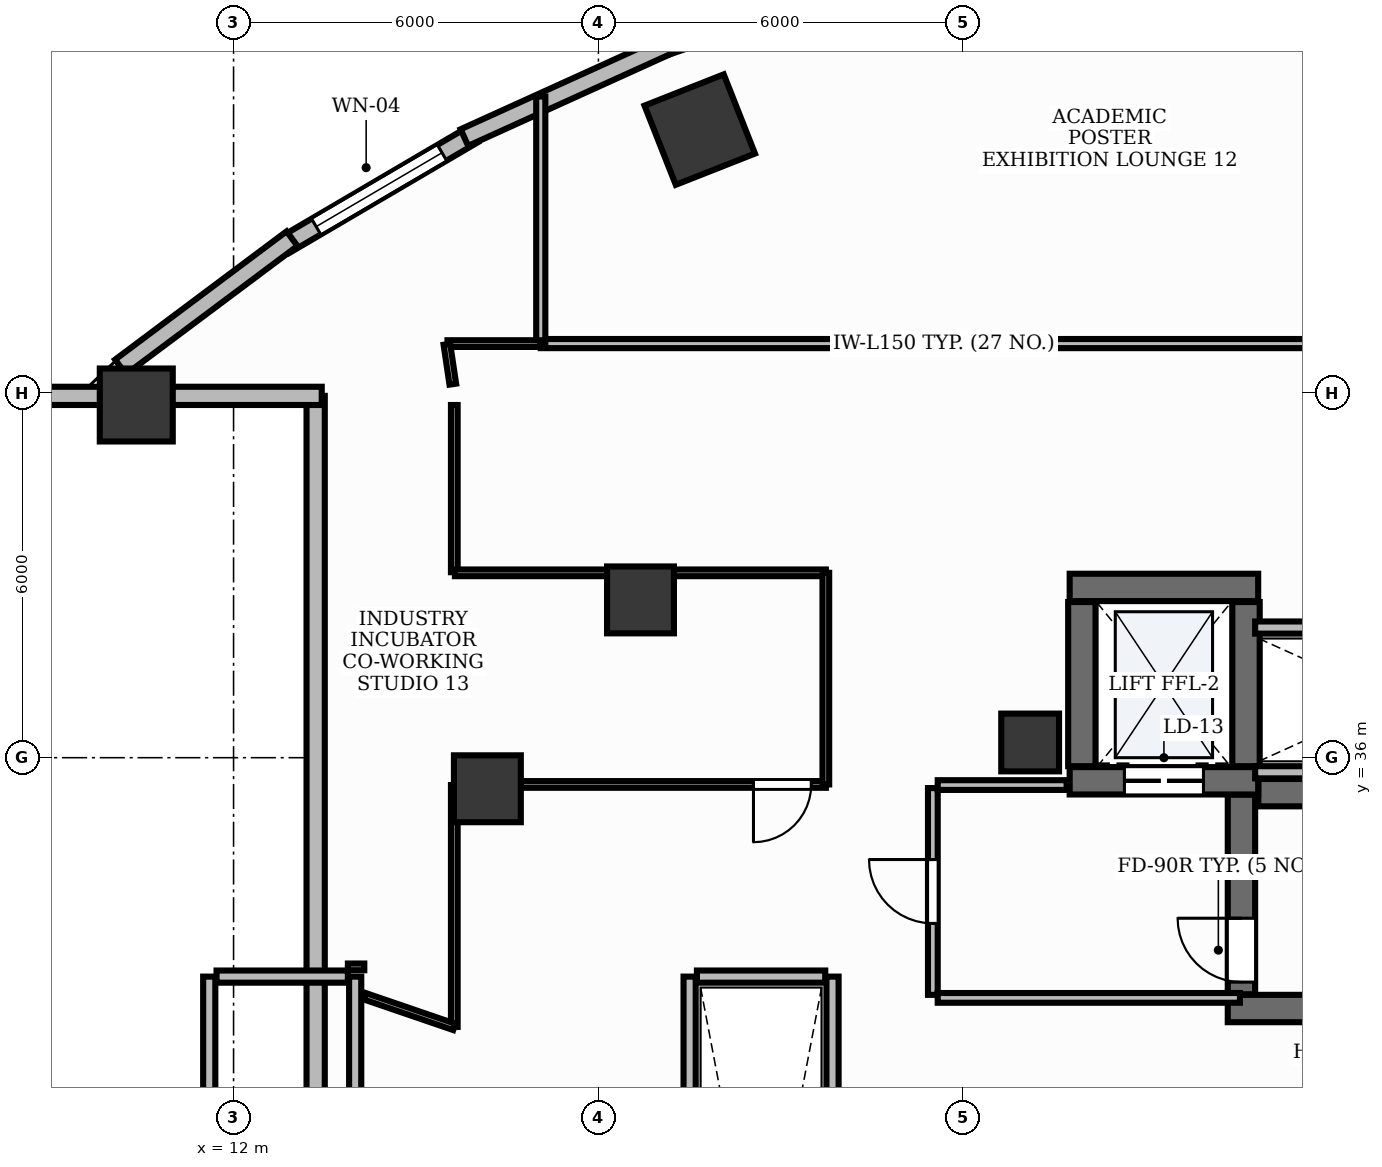
"""IFC4 building model, lengths in metres.
Left out: names, types, materials, properties, quantities, classifications, styles, units other than length and angle.
Written with IfcOpenShell. Run it as: python <this file> out.ifc"""

import sys

from ifc_helpers import new_model, si_unit, direction, frame, frame_2d, origin, origin_2d, place, context, subcontext, project, spatial, rectangle, extrude, element, fill, save


model = new_model("IFC4")
c1 = context("Model", 3, precision=1e-05, world=origin(), true_north=direction((0.0, 1.0)))
c2 = subcontext(c1, "Body", "Model", "MODEL_VIEW")
j1 = project(units=[si_unit("LENGTHUNIT", "METRE"), si_unit("PLANEANGLEUNIT", "RADIAN")], contexts=[c1])
p1 = place(None, origin())
s1 = spatial("IfcSite", under=j1, at=p1, CompositionType="ELEMENT")
p2 = place(p1, origin())
s2 = spatial("IfcBuilding", under=s1, at=p2, CompositionType="ELEMENT")
p3 = place(p2, frame((0.0, 0.0, 5.4)))
s3 = spatial("IfcBuildingStorey", under=s2, at=p3, CompositionType="ELEMENT", Elevation=5.4)
p4 = place(p3, frame((28.852, 35.425, 0.0), z_axis=(0.0, 0.0, 1.0), x_axis=(1.0, 0.0, 0.0)))
e1 = element("IfcWall", 1, at=p4, inside=s3, PredefinedType="SHEAR", context=c2, shape_type="SweptSolid", body=[
    extrude(rectangle(XDim=8.248, YDim=0.45, at=frame_2d((4.124, 0.0))), origin(), (0.0, 0.0, 1.0), 4.5),
])
p5 = place(p3, frame((28.35, 31.875, 0.0), z_axis=(0.0, 0.0, 1.0), x_axis=(1.0, 0.0, 0.0)))
e2 = element("IfcWall", 2, at=p5, inside=s3, PredefinedType="SHEAR", context=c2, shape_type="SweptSolid", body=[
    extrude(rectangle(XDim=8.75, YDim=0.45, at=frame_2d((4.375, 0.0))), origin(), (0.0, 0.0, 1.0), 4.5),
])
p6 = place(p3, frame((28.575, 32.11, 0.0), z_axis=(0.0, 0.0, 1.0), x_axis=(0.0, 1.0, 0.0)))
e3 = element("IfcWall", 3, at=p6, inside=s3, PredefinedType="SHEAR", context=c2, shape_type="SweptSolid", body=[
    extrude(rectangle(XDim=3.283, YDim=0.45, at=frame_2d((1.642, 0.0))), origin(), (0.0, 0.0, 1.0), 4.5),
])
p7 = place(p6, frame((0.2, 0.0, 0.0)))
e4 = element("IfcOpeningElement", 4, at=p7, cuts=e3, PredefinedType="OPENING", context=c2, shape_type="SweptSolid", body=[
    extrude(rectangle(XDim=1.05, YDim=2.15, at=frame_2d((0.525, 1.075))), frame((0.0, 0.24, 0.0), z_axis=(0.0, -1.0, 0.0), x_axis=(1.0, 0.0, 0.0)), (0.0, 0.0, 1.0), 0.48),
])
p8 = place(p3, frame((25.75, 38.8, 0.0), z_axis=(0.0, 0.0, 1.0), x_axis=(1.0, 0.0, 0.0)))
e5 = element("IfcWall", 5, at=p8, inside=s3, PredefinedType="SHEAR", context=c2, shape_type="SweptSolid", body=[
    extrude(rectangle(XDim=3.1, YDim=0.45, at=frame_2d((1.55, 0.0))), origin(), (0.0, 0.0, 1.0), 4.5),
])
p9 = place(p3, frame((25.75, 35.62, 0.0), z_axis=(0.0, 0.0, 1.0), x_axis=(1.0, 0.0, 0.0)))
e6 = element("IfcWall", 6, at=p9, inside=s3, PredefinedType="SHEAR", context=c2, shape_type="SweptSolid", body=[
    extrude(rectangle(XDim=3.1, YDim=0.45, at=frame_2d((1.55, 0.0))), origin(), (0.0, 0.0, 1.0), 4.5),
])
p10 = place(p9, frame((0.9, 0.0, 0.0)))
e7 = element("IfcOpeningElement", 7, at=p10, cuts=e6, PredefinedType="OPENING", context=c2, shape_type="SweptSolid", body=[
    extrude(rectangle(XDim=1.3, YDim=2.2, at=frame_2d((0.65, 1.1))), frame((0.0, 0.24, 0.0), z_axis=(0.0, -1.0, 0.0), x_axis=(1.0, 0.0, 0.0)), (0.0, 0.0, 1.0), 0.48),
])
for number, where, z_axis, x_axis in (
    (8, (25.95, 35.86, 0.0), (0.0, 0.0, 1.0), (0.0, 1.0, 0.0)),
    (9, (28.65, 35.86, 0.0), (0.0, 0.0, 1.0), (0.0, 1.0, 0.0)),
):
    element("IfcWall", number, at=place(p3, frame(where, z_axis=z_axis, x_axis=x_axis)), inside=s3, PredefinedType="SHEAR", context=c2, shape_type="SweptSolid", body=[
        extrude(rectangle(XDim=2.7, YDim=0.45, at=frame_2d((1.35, 0.0))), origin(), (0.0, 0.0, 1.0), 4.5),
    ])
p11 = place(p3, frame((25.1, 36.25, -0.0), z_axis=(0.0, 0.0, 1.0), x_axis=(1.0, 0.0, 0.0)))
e10 = element("IfcColumn", 10, at=p11, inside=s3, PredefinedType="PILASTER", context=c2, shape_type="SweptSolid", body=[
    extrude(rectangle(XDim=0.95, YDim=0.95, at=origin_2d()), origin(), (0.0, 0.0, 1.0), 4.501),
])
p12 = place(p3, frame((10.4, 41.8, -0.32), z_axis=(0.0, 0.0, 1.0), x_axis=(1.0, 0.0, 0.0)))
e11 = element("IfcColumn", 11, at=p12, inside=s3, PredefinedType="COLUMN", context=c2, shape_type="SweptSolid", body=[
    extrude(rectangle(XDim=1.2, YDim=1.2, at=origin_2d()), origin(), (0.0, 0.0, 1.0), 4.82),
])
p13 = place(p3, frame((19.667, 46.329, -0.0), z_axis=(0.0, 0.0, 1.0), x_axis=(0.930225540858, 0.366988341962, 0.0)))
e12 = element("IfcColumn", 12, at=p13, inside=s3, PredefinedType="COLUMN", context=c2, shape_type="SweptSolid", body=[
    extrude(rectangle(XDim=1.4, YDim=1.4, at=origin_2d()), origin(), (0.0, 0.0, 1.0), 4.501),
])
for number, where, z_axis, x_axis in (
    (13, (18.692, 38.595, -0.0), (0.0, 0.0, 1.0), (1.0, 0.0, 0.0)),
    (14, (16.174, 35.489, -0.0), (0.0, 0.0, 1.0), (1.0, 0.0, 0.0)),
):
    element("IfcColumn", number, at=place(p3, frame(where, z_axis=z_axis, x_axis=x_axis)), inside=s3, PredefinedType="COLUMN", context=c2, shape_type="SweptSolid", body=[
        extrude(rectangle(XDim=1.1, YDim=1.1, at=origin_2d()), origin(), (0.0, 0.0, 1.0), 4.501),
    ])
p14 = place(p3, frame((15.944, 46.25, 0.0), z_axis=(0.0, 0.0, 1.0), x_axis=(-0.862473134325, -0.506102847817, 0.0)))
e15 = element("IfcWall", 15, at=p14, inside=s3, PredefinedType="STANDARD", context=c2, shape_type="SweptSolid", body=[
    extrude(rectangle(XDim=3.595, YDim=0.3, at=frame_2d((1.798, 0.0))), origin(), (0.0, 0.0, 1.0), 4.5),
])
p15 = place(p14, frame((0.598, 0.0, 1.5)))
e16 = element("IfcOpeningElement", 16, at=p15, cuts=e15, PredefinedType="OPENING", context=c2, shape_type="SweptSolid", body=[
    extrude(rectangle(XDim=2.4, YDim=1.2, at=frame_2d((1.2, 0.6))), frame((0.0, 0.165, 0.0), z_axis=(0.0, -1.0, 0.0), x_axis=(1.0, 0.0, 0.0)), (0.0, 0.0, 1.0), 0.33),
])
p16 = place(p3, frame((22.667, 48.909, 0.0), z_axis=(0.0, 0.0, 1.0), x_axis=(-0.94702579403, -0.321157508773, 0.0)))
e17 = element("IfcWall", 17, at=p16, inside=s3, PredefinedType="STANDARD", context=c2, shape_type="SweptSolid", body=[
    extrude(rectangle(XDim=3.83, YDim=0.3, at=frame_2d((1.915, 0.0))), origin(), (0.0, 0.0, 1.0), 4.5),
])
p17 = place(p3, frame((19.201, 47.743, 0.0), z_axis=(0.0, 0.0, 1.0), x_axis=(-0.910623406862, -0.413237233166, 0.0)))
e18 = element("IfcWall", 18, at=p17, inside=s3, PredefinedType="STANDARD", context=c2, shape_type="SweptSolid", body=[
    extrude(rectangle(XDim=3.74, YDim=0.3, at=frame_2d((1.87, 0.0))), origin(), (0.0, 0.0, 1.0), 4.5),
])
p18 = place(p3, frame((12.961, 44.535, 0.0), z_axis=(0.0, 0.0, 1.0), x_axis=(-0.800823020995, -0.598901067827, 0.0)))
e19 = element("IfcWall", 19, at=p18, inside=s3, PredefinedType="STANDARD", context=c2, shape_type="SweptSolid", body=[
    extrude(rectangle(XDim=3.521, YDim=0.3, at=frame_2d((1.76, 0.0))), origin(), (0.0, 0.0, 1.0), 4.5),
])
p19 = place(p3, frame((13.35, 12.05, 0.0), z_axis=(0.0, 0.0, 1.0), x_axis=(0.0, 1.0, 0.0)))
e20 = element("IfcWall", 20, at=p19, inside=s3, PredefinedType="STANDARD", context=c2, shape_type="SweptSolid", body=[
    extrude(rectangle(XDim=29.9, YDim=0.3, at=frame_2d((14.95, 0.0))), origin(), (0.0, 0.0, 1.0), 4.5),
])
p20 = place(p3, frame((8.6, 41.95, 0.0), z_axis=(0.0, 0.0, 1.0), x_axis=(1.0, 0.0, 0.0)))
e21 = element("IfcWall", 21, at=p20, inside=s3, PredefinedType="STANDARD", context=c2, shape_type="SweptSolid", body=[
    extrude(rectangle(XDim=4.85, YDim=0.3, at=frame_2d((2.425, 0.0))), origin(), (0.0, 0.0, 1.0), 4.5),
])
for number, where, z_axis, x_axis in (
    (22, (11.6, 21.6, 0.0), (0.0, 0.0, 1.0), (0.0, 1.0, 0.0)),
    (23, (14.0, 21.6, 0.0), (0.0, 0.0, 1.0), (0.0, 1.0, 0.0)),
):
    element("IfcWall", number, at=place(p3, frame(where, z_axis=z_axis, x_axis=x_axis)), inside=s3, PredefinedType="PARTITIONING", context=c2, shape_type="SweptSolid", body=[
        extrude(rectangle(XDim=10.8, YDim=0.2, at=frame_2d((5.4, 0.0))), origin(), (0.0, 0.0, 1.0), 3.51),
    ])
p21 = place(p3, frame((11.72, 32.4, 0.0), z_axis=(0.0, 0.0, 1.0), x_axis=(1.0, 0.0, 0.0)))
e24 = element("IfcWall", 24, at=p21, inside=s3, PredefinedType="PARTITIONING", context=c2, shape_type="SweptSolid", body=[
    extrude(rectangle(XDim=2.16, YDim=0.2, at=frame_2d((1.08, 0.0))), origin(), (0.0, 0.0, 1.0), 3.51),
])
for number, where, z_axis, x_axis in (
    (25, (19.5, 21.6, 0.0), (0.0, 0.0, 1.0), (0.0, 1.0, 0.0)),
    (26, (21.85, 21.6, 0.0), (0.0, 0.0, 1.0), (0.0, 1.0, 0.0)),
):
    element("IfcWall", number, at=place(p3, frame(where, z_axis=z_axis, x_axis=x_axis)), inside=s3, PredefinedType="PARTITIONING", context=c2, shape_type="SweptSolid", body=[
        extrude(rectangle(XDim=10.8, YDim=0.2, at=frame_2d((5.4, 0.0))), origin(), (0.0, 0.0, 1.0), 3.51),
    ])
p22 = place(p3, frame((19.62, 32.4, 0.0), z_axis=(0.0, 0.0, 1.0), x_axis=(1.0, 0.0, 0.0)))
e27 = element("IfcWall", 27, at=p22, inside=s3, PredefinedType="PARTITIONING", context=c2, shape_type="SweptSolid", body=[
    extrude(rectangle(XDim=2.11, YDim=0.2, at=frame_2d((1.055, 0.0))), origin(), (0.0, 0.0, 1.0), 3.51),
])
for number, where, z_axis, x_axis in (
    (28, (28.8, 35.76, 0.0), (0.0, 0.0, 1.0), (1.0, 0.0, 0.0)),
    (29, (28.8, 38.14, 0.0), (0.0, 0.0, 1.0), (1.0, 0.0, 0.0)),
):
    element("IfcWall", number, at=place(p3, frame(where, z_axis=z_axis, x_axis=x_axis)), inside=s3, PredefinedType="PARTITIONING", context=c2, shape_type="SweptSolid", body=[
        extrude(rectangle(XDim=4.57, YDim=0.2, at=frame_2d((2.285, 0.0))), origin(), (0.0, 0.0, 1.0), 3.51),
    ])
p23 = place(p3, frame((23.5, 32.1, 0.0), z_axis=(0.0, 0.0, 1.0), x_axis=(0.0, 1.0, 0.0)))
e30 = element("IfcWall", 30, at=p23, inside=s3, PredefinedType="PARTITIONING", context=c2, shape_type="SweptSolid", body=[
    extrude(rectangle(XDim=3.4, YDim=0.16, at=frame_2d((1.7, 0.0))), origin(), (0.0, 0.0, 1.0), 3.51),
])
p24 = place(p23, frame((1.175, 0.0, 0.0)))
e31 = element("IfcOpeningElement", 31, at=p24, cuts=e30, PredefinedType="OPENING", context=c2, shape_type="SweptSolid", body=[
    extrude(rectangle(XDim=1.05, YDim=2.15, at=frame_2d((0.525, 1.075))), frame((0.0, 0.095, 0.0), z_axis=(0.0, -1.0, 0.0), x_axis=(1.0, 0.0, 0.0)), (0.0, 0.0, 1.0), 0.19),
])
p25 = place(p3, frame((23.58, 32.05, 0.0), z_axis=(0.0, 0.0, 1.0), x_axis=(1.0, 0.0, 0.0)))
e32 = element("IfcWall", 32, at=p25, inside=s3, PredefinedType="PARTITIONING", context=c2, shape_type="SweptSolid", body=[
    extrude(rectangle(XDim=4.97, YDim=0.16, at=frame_2d((2.485, 0.0))), origin(), (0.0, 0.0, 1.0), 3.51),
])
p26 = place(p3, frame((23.58, 35.55, 0.0), z_axis=(0.0, 0.0, 1.0), x_axis=(1.0, 0.0, 0.0)))
e33 = element("IfcWall", 33, at=p26, inside=s3, PredefinedType="PARTITIONING", context=c2, shape_type="SweptSolid", body=[
    extrude(rectangle(XDim=2.12, YDim=0.16, at=frame_2d((1.06, 0.0))), origin(), (0.0, 0.0, 1.0), 3.51),
])
p27 = place(p3, frame((31.721, 42.81, 0.0), z_axis=(0.0, 0.0, 1.0), x_axis=(-1.0, 0.0, 0.0)))
e34 = element("IfcWall", 34, at=p27, inside=s3, PredefinedType="PARTITIONING", context=c2, shape_type="SweptSolid", body=[
    extrude(rectangle(XDim=14.669, YDim=0.15, at=frame_2d((7.334, 0.0))), origin(), (0.0, 0.0, 1.0), 3.51),
])
p28 = place(p27, frame((0.24, 0.0, 0.0)))
e35 = element("IfcOpeningElement", 35, at=p28, cuts=e34, PredefinedType="OPENING", context=c2, shape_type="SweptSolid", body=[
    extrude(rectangle(XDim=0.95, YDim=2.15, at=frame_2d((0.475, 1.075))), frame((0.0, 0.09, 0.0), z_axis=(0.0, -1.0, 0.0), x_axis=(1.0, 0.0, 0.0)), (0.0, 0.0, 1.0), 0.18),
])
p29 = place(p3, frame((21.74, 35.56, 0.0), z_axis=(0.0, 0.0, 1.0), x_axis=(-1.0, 0.0, 0.0)))
e36 = element("IfcWall", 36, at=p29, inside=s3, PredefinedType="MOVABLE", context=c2, shape_type="SweptSolid", body=[
    extrude(rectangle(XDim=6.1, YDim=0.11, at=frame_2d((3.05, 0.0))), origin(), (0.0, 0.0, 1.0), 3.51),
])
p30 = place(p29, frame((0.24, 0.0, 0.0)))
e37 = element("IfcOpeningElement", 37, at=p30, cuts=e36, PredefinedType="OPENING", context=c2, shape_type="SweptSolid", body=[
    extrude(rectangle(XDim=0.95, YDim=2.15, at=frame_2d((0.475, 1.075))), frame((0.0, 0.07, 0.0), z_axis=(0.0, -1.0, 0.0), x_axis=(1.0, 0.0, 0.0)), (0.0, 0.0, 1.0), 0.14),
])
p31 = place(p3, frame((17.052, 42.81, 0.0), z_axis=(0.0, 0.0, 1.0), x_axis=(0.0, 1.0, 0.0)))
e38 = element("IfcWall", 38, at=p31, inside=s3, PredefinedType="PARTITIONING", context=c2, shape_type="SweptSolid", body=[
    extrude(rectangle(XDim=4.063, YDim=0.15, at=frame_2d((2.031, 0.0))), origin(), (0.0, 0.0, 1.0), 3.51),
])
p32 = place(p3, frame((17.042, 42.81, 0.0), z_axis=(0.0, 0.0, 1.0), x_axis=(-1.0, 0.0, 0.0)))
e39 = element("IfcWall", 39, at=p32, inside=s3, PredefinedType="MOVABLE", context=c2, shape_type="SweptSolid", body=[
    extrude(rectangle(XDim=1.524, YDim=0.11, at=frame_2d((0.762, 0.0))), origin(), (0.0, 0.0, 1.0), 3.51),
])
p33 = place(p3, frame((15.508, 42.799, 0.0), z_axis=(0.0, 0.0, 1.0), x_axis=(0.146882189547, -0.989153993266, 0.0)))
e40 = element("IfcWall", 40, at=p33, inside=s3, PredefinedType="MOVABLE", context=c2, shape_type="SweptSolid", body=[
    extrude(rectangle(XDim=0.663, YDim=0.11, at=frame_2d((0.332, 0.0))), origin(), (0.0, 0.0, 1.0), 3.51),
])
p34 = place(p3, frame((15.63, 41.8, 0.0), z_axis=(0.0, 0.0, 1.0), x_axis=(0.0, -1.0, 0.0)))
e41 = element("IfcWall", 41, at=p34, inside=s3, PredefinedType="MOVABLE", context=c2, shape_type="SweptSolid", body=[
    extrude(rectangle(XDim=2.75, YDim=0.11, at=frame_2d((1.375, 0.0))), origin(), (0.0, 0.0, 1.0), 3.51),
])
p35 = place(p3, frame((15.64, 39.04, 0.0), z_axis=(0.0, 0.0, 1.0), x_axis=(1.0, 0.0, 0.0)))
e42 = element("IfcWall", 42, at=p35, inside=s3, PredefinedType="MOVABLE", context=c2, shape_type="SweptSolid", body=[
    extrude(rectangle(XDim=6.1, YDim=0.11, at=frame_2d((3.05, 0.0))), origin(), (0.0, 0.0, 1.0), 3.51),
])
p36 = place(p3, frame((21.74, 39.04, 0.0), z_axis=(0.0, 0.0, 1.0), x_axis=(0.0, -1.0, 0.0)))
e43 = element("IfcWall", 43, at=p36, inside=s3, PredefinedType="MOVABLE", context=c2, shape_type="SweptSolid", body=[
    extrude(rectangle(XDim=3.48, YDim=0.11, at=frame_2d((1.74, 0.0))), origin(), (0.0, 0.0, 1.0), 3.51),
])
p37 = place(p3, frame((15.63, 35.55, 0.0), z_axis=(0.0, 0.0, 1.0), x_axis=(0.0, -1.0, 0.0)))
e44 = element("IfcWall", 44, at=p37, inside=s3, PredefinedType="MOVABLE", context=c2, shape_type="SweptSolid", body=[
    extrude(rectangle(XDim=3.977, YDim=0.11, at=frame_2d((1.989, 0.0))), origin(), (0.0, 0.0, 1.0), 3.51),
])
p38 = place(p3, frame((15.63, 31.573, 0.0), z_axis=(0.0, 0.0, 1.0), x_axis=(-0.946058826871, 0.323994901347, 0.0)))
e45 = element("IfcWall", 45, at=p38, inside=s3, PredefinedType="MOVABLE", context=c2, shape_type="SweptSolid", body=[
    extrude(rectangle(XDim=1.554, YDim=0.11, at=frame_2d((0.777, 0.0))), origin(), (0.0, 0.0, 1.0), 3.51),
])
p39 = place(p3, frame((14.15, 32.56, 0.0), z_axis=(0.0, 0.0, 1.0), x_axis=(-1.0, 0.0, 0.0)))
e46 = element("IfcWall", 46, at=p39, inside=s3, PredefinedType="MOVABLE", context=c2, shape_type="SweptSolid", body=[
    extrude(rectangle(XDim=0.27, YDim=0.11, at=frame_2d((0.135, 0.0))), origin(), (0.0, 0.0, 1.0), 3.51),
])
p40 = place(p15, origin())
e47 = element("IfcWindow", 47, at=p40, inside=s3, PartitioningType="DOUBLE_PANEL_HORIZONTAL", PredefinedType="WINDOW", context=c2, shape_type="SweptSolid", body=[
    extrude(rectangle(XDim=2.4, YDim=1.2, at=frame_2d((1.2, 0.6))), frame((0.0, 0.03, 0.0), z_axis=(0.0, -1.0, 0.0), x_axis=(1.0, 0.0, 0.0)), (0.0, 0.0, 1.0), 0.06),
])
fill(e16, e47)
p41 = place(p7, origin())
e48 = element("IfcDoor", 48, at=p41, inside=s3, OperationType="SINGLE_SWING_RIGHT", PredefinedType="DOOR", context=c2, shape_type="SweptSolid", body=[
    extrude(rectangle(XDim=1.05, YDim=2.15, at=frame_2d((0.525, 1.075))), frame((0.0, 0.025, 0.0), z_axis=(0.0, -1.0, 0.0), x_axis=(1.0, 0.0, 0.0)), (0.0, 0.0, 1.0), 0.05),
])
fill(e4, e48)
p42 = place(p10, origin())
e49 = element("IfcDoor", 49, at=p42, inside=s3, OperationType="DOUBLE_DOOR_SLIDING", PredefinedType="DOOR", context=c2, shape_type="SweptSolid", body=[
    extrude(rectangle(XDim=1.3, YDim=2.2, at=frame_2d((0.65, 1.1))), frame((0.0, 0.025, 0.0), z_axis=(0.0, -1.0, 0.0), x_axis=(1.0, 0.0, 0.0)), (0.0, 0.0, 1.0), 0.05),
])
fill(e7, e49)
p43 = place(p24, origin())
e50 = element("IfcDoor", 50, at=p43, inside=s3, OperationType="SINGLE_SWING_RIGHT", PredefinedType="DOOR", context=c2, shape_type="SweptSolid", body=[
    extrude(rectangle(XDim=1.05, YDim=2.15, at=frame_2d((0.525, 1.075))), frame((0.0, 0.025, 0.0), z_axis=(0.0, -1.0, 0.0), x_axis=(1.0, 0.0, 0.0)), (0.0, 0.0, 1.0), 0.05),
])
fill(e31, e50)
p44 = place(p30, origin())
e51 = element("IfcDoor", 51, at=p44, inside=s3, OperationType="SINGLE_SWING_RIGHT", PredefinedType="DOOR", context=c2, shape_type="SweptSolid", body=[
    extrude(rectangle(XDim=0.95, YDim=2.15, at=frame_2d((0.475, 1.075))), frame((0.0, 0.025, 0.0), z_axis=(0.0, -1.0, 0.0), x_axis=(1.0, 0.0, 0.0)), (0.0, 0.0, 1.0), 0.05),
])
fill(e37, e51)
save(model, sys.argv[1])
